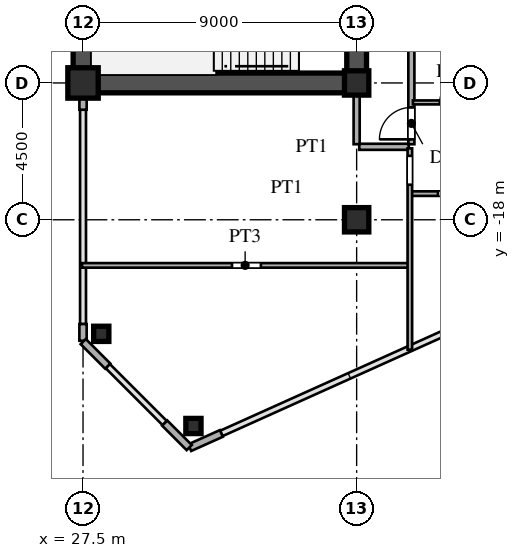
"""IFC4 building model, lengths in metres.
Left out: names, types, materials, properties, quantities, classifications, styles, units other than length and angle.
Written with IfcOpenShell. Run it as: python <this file> out.ifc"""

import sys

from ifc_helpers import new_model, si_unit, direction, frame, frame_2d, origin, origin_2d, place, context, subcontext, project, spatial, rectangle, hollow_rectangle, i_section, extrude, source, transform, mapped, element, fill, save


model = new_model("IFC4")
c1 = context("Model", 3, precision=1e-05, world=origin(), true_north=direction((0.0, 1.0)))
c2 = subcontext(c1, "Body", "Model", "MODEL_VIEW")
j1 = project(units=[si_unit("LENGTHUNIT", "METRE"), si_unit("PLANEANGLEUNIT", "RADIAN")], contexts=[c1])
p1 = place(None, origin())
s1 = spatial("IfcSite", under=j1, at=p1, CompositionType="ELEMENT")
p2 = place(p1, origin())
s2 = spatial("IfcBuilding", under=s1, at=p2, CompositionType="ELEMENT")
p3 = place(p2, frame((0.0, 0.0, 83.7)))
s3 = spatial("IfcBuildingStorey", under=s2, at=p3, CompositionType="ELEMENT", Elevation=83.7)
m1 = source(origin(), c2, "Body", "SweptSolid", [
    extrude(hollow_rectangle(XDim=1.0, YDim=1.0, WallThickness=0.042, at=origin_2d()), origin(), (0.0, 0.0, 1.0), 3.6),
])
p4 = place(p3, frame((27.5, -13.5, 0.0), z_axis=(0.0, 0.0, 1.0), x_axis=(1.0, 0.0, 0.0)))
e1 = element("IfcColumn", 1, at=p4, inside=s3, PredefinedType="COLUMN", context=c2, shape_type="MappedRepresentation", body=[
    mapped(m1, transform((0.0, 0.0, 0.0), scale=1.0)),
])
m2 = source(origin(), c2, "Body", "SweptSolid", [
    extrude(i_section(OverallWidth=0.8, OverallDepth=0.8, WebThickness=0.032, FlangeThickness=0.05, at=origin_2d()), origin(), (0.0, 0.0, 1.0), 3.6),
])
for number, where, z_axis, x_axis in (
    (2, (36.5, -18.0, 0.0), (0.0, 0.0, 1.0), (1.0, 0.0, 0.0)),
    (3, (36.5, -13.5, 0.0), (0.0, 0.0, 1.0), (1.0, 0.0, 0.0)),
):
    element("IfcColumn", number, at=place(p3, frame(where, z_axis=z_axis, x_axis=x_axis)), inside=s3, PredefinedType="COLUMN", context=c2, shape_type="MappedRepresentation", body=[
        mapped(m2, transform((0.0, 0.0, 0.0), scale=1.0)),
    ])
m3 = source(origin(), c2, "Body", "SweptSolid", [
    extrude(hollow_rectangle(XDim=0.5, YDim=0.5, WallThickness=0.02, at=origin_2d()), origin(), (0.0, 0.0, 1.0), 3.6),
])
for number, where, z_axis, x_axis in (
    (4, (31.131, -24.783, 0.0), (0.0, 0.0, 1.0), (1.0, 0.0, 0.0)),
    (5, (28.1, -21.751, 0.0), (0.0, 0.0, 1.0), (1.0, 0.0, 0.0)),
):
    element("IfcColumn", number, at=place(p3, frame(where, z_axis=z_axis, x_axis=x_axis)), inside=s3, PredefinedType="COLUMN", context=c2, shape_type="MappedRepresentation", body=[
        mapped(m3, transform((0.0, 0.0, 0.0), scale=1.0)),
    ])
p5 = place(p3, frame((31.009, -25.496, 0.0), z_axis=(0.0, 0.0, 1.0), x_axis=(0.911929519623, 0.410346866979, 0.0)))
e6 = element("IfcWall", 6, at=p5, inside=s3, PredefinedType="SOLIDWALL", context=c2, shape_type="SweptSolid", body=[
    extrude(rectangle(XDim=1.14, YDim=0.24, at=frame_2d((0.57, 0.0))), origin(), (0.0, 0.0, 1.0), 3.34),
])
p6 = place(p3, frame((27.5, -21.98, 0.0), z_axis=(0.0, 0.0, 1.0), x_axis=(0.0, 1.0, 0.0)))
e7 = element("IfcWall", 7, at=p6, inside=s3, PredefinedType="SOLIDWALL", context=c2, shape_type="SweptSolid", body=[
    extrude(rectangle(XDim=0.55, YDim=0.24, at=frame_2d((0.275, 0.0))), origin(), (0.0, 0.0, 1.0), 3.34),
])
p7 = place(p3, frame((27.5, -14.38, 0.0), z_axis=(0.0, 0.0, 1.0), x_axis=(0.0, 1.0, 0.0)))
e8 = element("IfcWall", 8, at=p7, inside=s3, PredefinedType="SOLIDWALL", context=c2, shape_type="SweptSolid", body=[
    extrude(rectangle(XDim=0.55, YDim=0.24, at=frame_2d((0.275, 0.0))), origin(), (0.0, 0.0, 1.0), 2.84),
])
for number, where, z_axis, x_axis in (
    (9, (27.507, -22.007, 0.0), (0.0, 0.0, 1.0), (0.707, -0.707, 0.0)),
    (10, (30.187, -24.687, 0.0), (0.0, 0.0, 1.0), (0.707, -0.707, 0.0)),
):
    element("IfcWall", number, at=place(p3, frame(where, z_axis=z_axis, x_axis=x_axis)), inside=s3, PredefinedType="SOLIDWALL", context=c2, shape_type="SweptSolid", body=[
        extrude(rectangle(XDim=1.14, YDim=0.24, at=frame_2d((0.57, 0.0))), origin(), (0.0, 0.0, 1.0), 3.34),
    ])
p8 = place(p3, frame((27.5, -13.5, 0.0), z_axis=(0.0, 0.0, 1.0), x_axis=(0.0, 1.0, 0.0)))
e11 = element("IfcWall", 11, at=p8, inside=s3, PredefinedType="SHEAR", context=c2, shape_type="SweptSolid", body=[
    extrude(rectangle(XDim=12.2, YDim=0.65, at=frame_2d((6.1, 0.0))), origin(), (0.0, 0.0, 1.0), 3.34),
])
p9 = place(p3, frame((27.5, -13.5, 0.0), z_axis=(0.0, 0.0, 1.0), x_axis=(1.0, 0.0, 0.0)))
e12 = element("IfcWall", 12, at=p9, inside=s3, PredefinedType="SHEAR", context=c2, shape_type="SweptSolid", body=[
    extrude(rectangle(XDim=9.0, YDim=0.65, at=frame_2d((4.5, 0.0))), origin(), (0.0, 0.0, 1.0), 3.34),
])
p10 = place(p3, frame((36.5, -13.65, 0.0), z_axis=(0.0, 0.0, 1.0), x_axis=(0.0, 1.0, 0.0)))
e13 = element("IfcWall", 13, at=p10, inside=s3, PredefinedType="SHEAR", context=c2, shape_type="SweptSolid", body=[
    extrude(rectangle(XDim=7.15, YDim=0.65, at=frame_2d((3.575, 0.0))), origin(), (0.0, 0.0, 1.0), 3.34),
])
p11 = place(p10, frame((4.675, 0.0, 0.0)))
e14 = element("IfcOpeningElement", 14, at=p11, cuts=e13, PredefinedType="OPENING", context=c2, shape_type="SweptSolid", body=[
    extrude(rectangle(XDim=1.15, YDim=2.2, at=frame_2d((0.575, 1.1))), frame((0.0, 0.335, 0.0), z_axis=(0.0, -1.0, 0.0), x_axis=(1.0, 0.0, 0.0)), (0.0, 0.0, 1.0), 0.67),
])
p12 = place(p3, frame((27.465, -19.5, 0.0), z_axis=(0.0, 0.0, 1.0), x_axis=(1.0, 0.0, 0.0)))
e15 = element("IfcWall", 15, at=p12, inside=s3, PredefinedType="PARTITIONING", context=c2, shape_type="SweptSolid", body=[
    extrude(rectangle(XDim=10.735, YDim=0.15, at=frame_2d((5.367, 0.0))), origin(), (0.0, 0.0, 1.0), 3.34),
])
p13 = place(p12, frame((4.935, 0.0, 0.0)))
e16 = element("IfcOpeningElement", 16, at=p13, cuts=e15, PredefinedType="OPENING", context=c2, shape_type="SweptSolid", body=[
    extrude(rectangle(XDim=0.95, YDim=2.15, at=frame_2d((0.475, 1.075))), frame((0.0, 0.085, 0.0), z_axis=(0.0, -1.0, 0.0), x_axis=(1.0, 0.0, 0.0)), (0.0, 0.0, 1.0), 0.17),
])
p14 = place(p3, frame((38.3, -17.14, 0.0), z_axis=(0.0, 0.0, 1.0), x_axis=(1.0, 0.0, 0.0)))
e17 = element("IfcWall", 17, at=p14, inside=s3, PredefinedType="PARTITIONING", context=c2, shape_type="SweptSolid", body=[
    extrude(rectangle(XDim=2.7, YDim=0.15, at=frame_2d((1.35, 0.0))), origin(), (0.0, 0.0, 1.0), 3.34),
])
p15 = place(p14, frame((0.875, 0.0, 0.0)))
e18 = element("IfcOpeningElement", 18, at=p15, cuts=e17, PredefinedType="OPENING", context=c2, shape_type="SweptSolid", body=[
    extrude(rectangle(XDim=0.95, YDim=2.15, at=frame_2d((0.475, 1.075))), frame((0.0, 0.085, 0.0), z_axis=(0.0, -1.0, 0.0), x_axis=(1.0, 0.0, 0.0)), (0.0, 0.0, 1.0), 0.17),
])
p16 = place(p3, frame((36.585, -15.6, 0.0), z_axis=(0.0, 0.0, 1.0), x_axis=(1.0, 0.0, 0.0)))
e19 = element("IfcWall", 19, at=p16, inside=s3, PredefinedType="PARTITIONING", context=c2, shape_type="SweptSolid", body=[
    extrude(rectangle(XDim=1.63, YDim=0.2, at=frame_2d((0.815, 0.0))), origin(), (0.0, 0.0, 1.0), 3.34),
])
p17 = place(p3, frame((38.35, -14.14, 0.0), z_axis=(0.0, 0.0, 1.0), x_axis=(1.0, 0.0, 0.0)))
e20 = element("IfcWall", 20, at=p17, inside=s3, PredefinedType="PARTITIONING", context=c2, shape_type="SweptSolid", body=[
    extrude(rectangle(XDim=2.65, YDim=0.13, at=frame_2d((1.325, 0.0))), origin(), (0.0, 0.0, 1.0), 3.34),
])
p18 = place(p17, frame((0.885, 0.0, 0.0)))
e21 = element("IfcOpeningElement", 21, at=p18, cuts=e20, PredefinedType="OPENING", context=c2, shape_type="SweptSolid", body=[
    extrude(rectangle(XDim=0.88, YDim=2.1, at=frame_2d((0.44, 1.05))), frame((0.0, 0.075, 0.0), z_axis=(0.0, -1.0, 0.0), x_axis=(1.0, 0.0, 0.0)), (0.0, 0.0, 1.0), 0.15),
])
p19 = place(p3, frame((36.5, -15.515, 0.0), z_axis=(0.0, 0.0, 1.0), x_axis=(0.0, 1.0, 0.0)))
e22 = element("IfcWall", 22, at=p19, inside=s3, PredefinedType="PARTITIONING", context=c2, shape_type="SweptSolid", body=[
    extrude(rectangle(XDim=1.685, YDim=0.2, at=frame_2d((0.842, 0.0))), origin(), (0.0, 0.0, 1.0), 2.44),
])
p20 = place(p3, frame((38.25, -22.273, 0.0), z_axis=(0.0, 0.0, 1.0), x_axis=(0.0, 1.0, 0.0)))
e23 = element("IfcWall", 23, at=p20, inside=s3, PredefinedType="PARTITIONING", context=c2, shape_type="SweptSolid", body=[
    extrude(rectangle(XDim=6.623, YDim=0.15, at=frame_2d((3.312, 0.0))), origin(), (0.0, 0.0, 1.0), 3.34),
])
p21 = place(p20, frame((5.426, 0.0, 0.0)))
e24 = element("IfcOpeningElement", 24, at=p21, cuts=e23, PredefinedType="OPENING", context=c2, shape_type="SweptSolid", body=[
    extrude(rectangle(XDim=0.95, YDim=2.15, at=frame_2d((0.475, 1.075))), frame((0.0, 0.085, 0.0), z_axis=(0.0, -1.0, 0.0), x_axis=(1.0, 0.0, 0.0)), (0.0, 0.0, 1.0), 0.17),
])
p22 = place(p3, frame((38.3, -15.515, 0.0), z_axis=(0.0, 0.0, 1.0), x_axis=(0.0, 1.0, 0.0)))
e25 = element("IfcWall", 25, at=p22, inside=s3, PredefinedType="PARTITIONING", context=c2, shape_type="SweptSolid", body=[
    extrude(rectangle(XDim=31.03, YDim=0.2, at=frame_2d((15.515, 0.0))), origin(), (0.0, 0.0, 1.0), 3.34),
])
p23 = place(p22, frame((0.16, 0.0, 0.0)))
e26 = element("IfcOpeningElement", 26, at=p23, cuts=e25, PredefinedType="OPENING", context=c2, shape_type="SweptSolid", body=[
    extrude(rectangle(XDim=1.05, YDim=2.25, at=frame_2d((0.525, 1.125))), frame((0.0, 0.11, 0.0), z_axis=(0.0, -1.0, 0.0), x_axis=(1.0, 0.0, 0.0)), (0.0, 0.0, 1.0), 0.22),
])
p24 = place(p22, frame((9.067, 0.0, 0.0)))
e27 = element("IfcOpeningElement", 27, at=p24, cuts=e25, PredefinedType="OPENING", context=c2, shape_type="SweptSolid", body=[
    extrude(rectangle(XDim=1.05, YDim=2.25, at=frame_2d((0.525, 1.125))), frame((0.0, 0.11, 0.0), z_axis=(0.0, -1.0, 0.0), x_axis=(1.0, 0.0, 0.0)), (0.0, 0.0, 1.0), 0.22),
])
p25 = place(p22, frame((20.325, 0.0, 0.0)))
e28 = element("IfcOpeningElement", 28, at=p25, cuts=e25, PredefinedType="OPENING", context=c2, shape_type="SweptSolid", body=[
    extrude(rectangle(XDim=1.05, YDim=2.25, at=frame_2d((0.525, 1.125))), frame((0.0, 0.11, 0.0), z_axis=(0.0, -1.0, 0.0), x_axis=(1.0, 0.0, 0.0)), (0.0, 0.0, 1.0), 0.22),
])
p26 = place(p22, frame((29.613, 0.0, 0.0)))
e29 = element("IfcOpeningElement", 29, at=p26, cuts=e25, PredefinedType="OPENING", context=c2, shape_type="SweptSolid", body=[
    extrude(rectangle(XDim=1.05, YDim=2.25, at=frame_2d((0.525, 1.125))), frame((0.0, 0.11, 0.0), z_axis=(0.0, -1.0, 0.0), x_axis=(1.0, 0.0, 0.0)), (0.0, 0.0, 1.0), 0.22),
])
m4 = source(origin(), c2, "Body", "SweptSolid", [
    extrude(rectangle(XDim=0.88, YDim=2.1, at=frame_2d((0.44, 1.05))), frame((0.0, 0.025, 0.0), z_axis=(0.0, -1.0, 0.0), x_axis=(1.0, 0.0, 0.0)), (0.0, 0.0, 1.0), 0.05),
])
p27 = place(p18, origin())
e30 = element("IfcDoor", 30, at=p27, inside=s3, OperationType="SINGLE_SWING_RIGHT", PredefinedType="DOOR", context=c2, shape_type="MappedRepresentation", body=[
    mapped(m4, transform((0.0, 0.0, 0.0), scale=1.0)),
])
fill(e21, e30)
m5 = source(origin(), c2, "Body", "SweptSolid", [
    extrude(rectangle(XDim=1.05, YDim=2.25, at=frame_2d((0.525, 1.125))), frame((0.0, 0.025, 0.0), z_axis=(0.0, -1.0, 0.0), x_axis=(1.0, 0.0, 0.0)), (0.0, 0.0, 1.0), 0.05),
])
p28 = place(p23, origin())
e31 = element("IfcDoor", 31, at=p28, inside=s3, OperationType="SINGLE_SWING_LEFT", PredefinedType="DOOR", context=c2, shape_type="MappedRepresentation", body=[
    mapped(m5, transform((0.0, 0.0, 0.0), scale=1.0)),
])
fill(e26, e31)
save(model, sys.argv[1])
